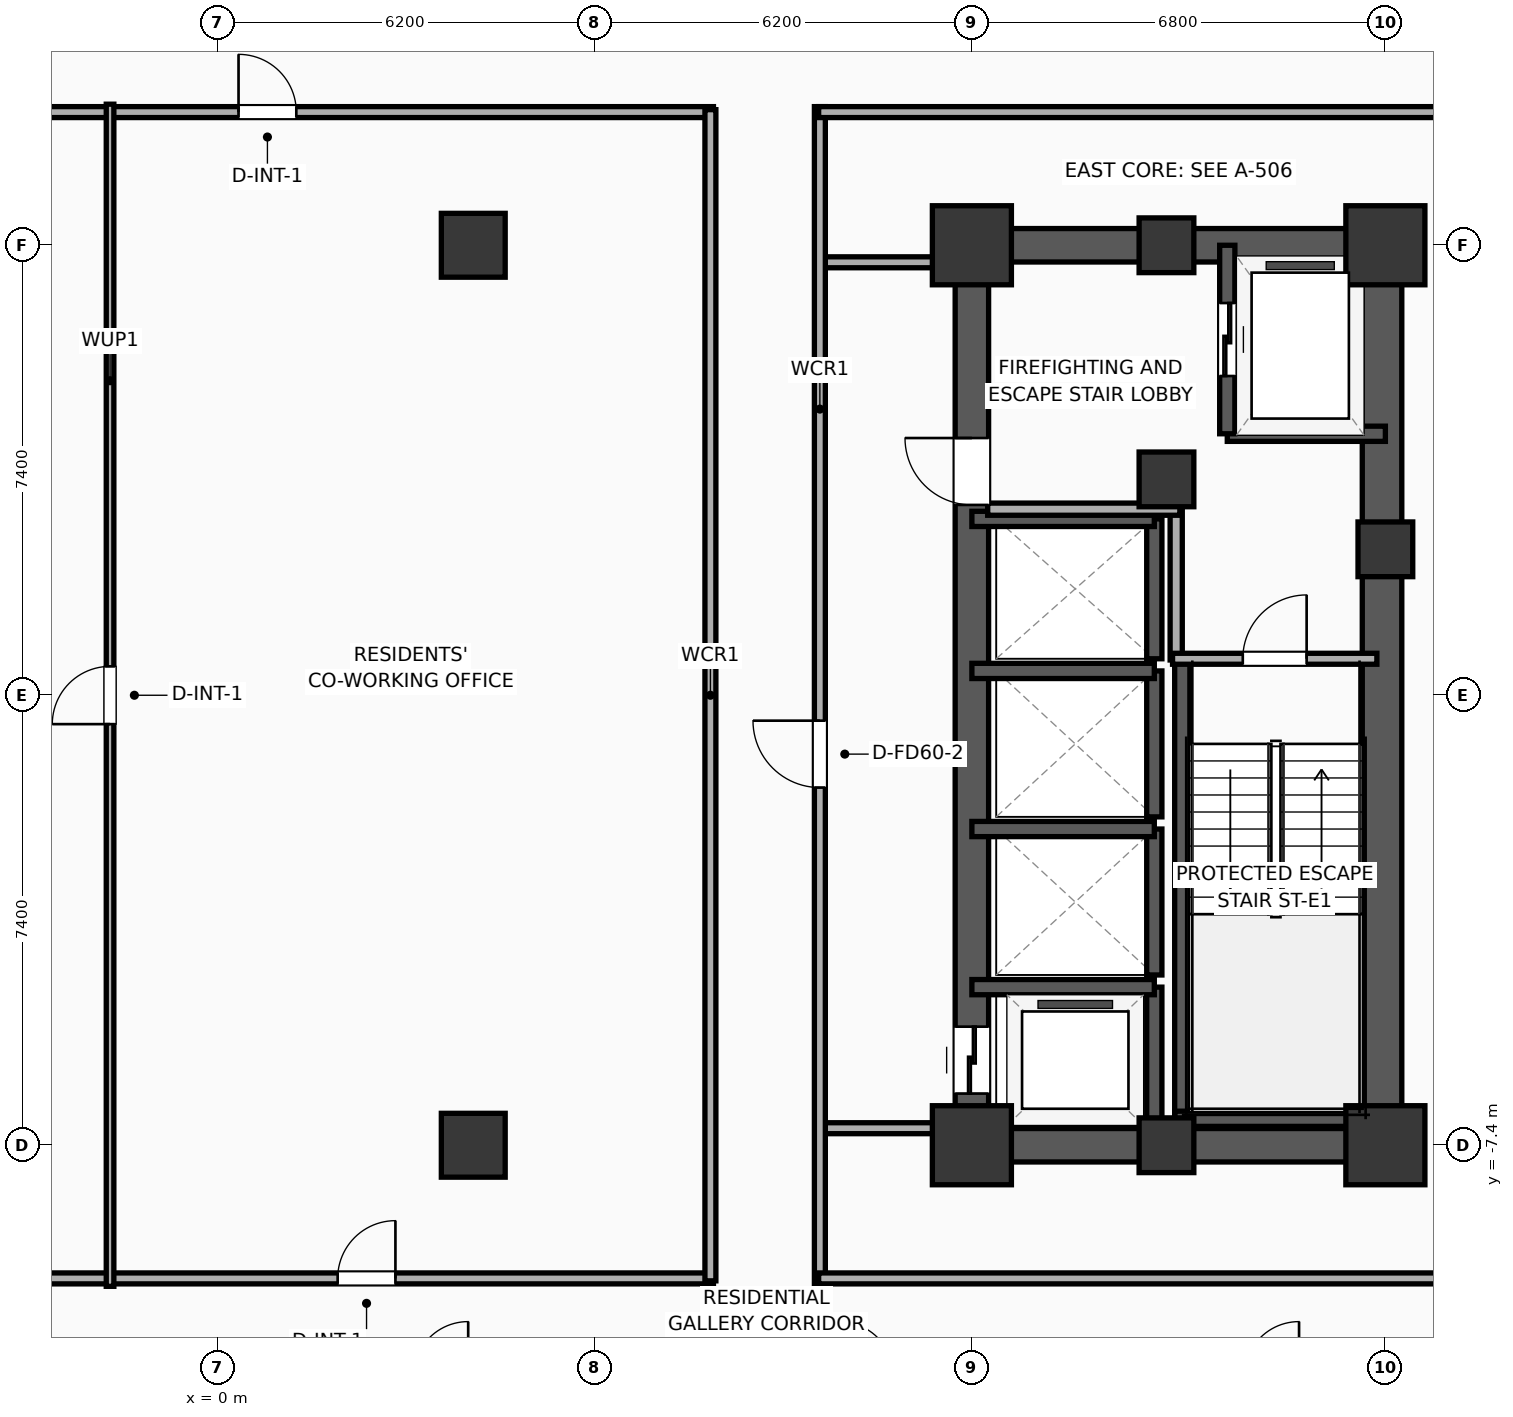
"""IFC4 building model, lengths in metres.
Left out: names, types, materials, properties, quantities, classifications, styles, units other than length and angle.
Written with IfcOpenShell. Run it as: python <this file> out.ifc"""

import sys

from ifc_helpers import new_model, si_unit, direction, frame, frame_2d, origin, origin_2d, place, context, subcontext, project, spatial, rectangle, extrude, element, fill, save


model = new_model("IFC4")
c1 = context("Model", 3, precision=1e-05, world=origin(), true_north=direction((0.0, 1.0)))
c2 = subcontext(c1, "Body", "Model", "MODEL_VIEW")
j1 = project(units=[si_unit("LENGTHUNIT", "METRE"), si_unit("PLANEANGLEUNIT", "RADIAN")], contexts=[c1])
p1 = place(None, origin())
s1 = spatial("IfcSite", under=j1, at=p1, CompositionType="ELEMENT")
p2 = place(p1, origin())
s2 = spatial("IfcBuilding", under=s1, at=p2, CompositionType="ELEMENT")
p3 = place(p2, frame((0.0, 0.0, 120.9)))
s3 = spatial("IfcBuildingStorey", under=s2, at=p3, CompositionType="ELEMENT", Elevation=120.9)
p4 = place(p3, frame((12.4, -7.4, 0.0), z_axis=(0.0, 0.0, 1.0), x_axis=(1.0, 0.0, 0.0)))
e1 = element("IfcColumn", 1, at=p4, inside=s3, PredefinedType="COLUMN", context=c2, shape_type="SweptSolid", body=[
    extrude(rectangle(XDim=1.3, YDim=1.3, at=origin_2d()), origin(), (0.0, 0.0, 1.0), 3.9),
])
p5 = place(p3, frame((15.6, 3.55, 0.0), z_axis=(0.0, 0.0, 1.0), x_axis=(1.0, 0.0, 0.0)))
e2 = element("IfcColumn", 2, at=p5, inside=s3, PredefinedType="COLUMN", context=c2, shape_type="SweptSolid", body=[
    extrude(rectangle(XDim=0.9, YDim=0.9, at=origin_2d()), origin(), (0.0, 0.0, 1.0), 3.9),
])
p6 = place(p3, frame((12.4, 7.4, 0.0), z_axis=(0.0, 0.0, 1.0), x_axis=(1.0, 0.0, 0.0)))
e3 = element("IfcColumn", 3, at=p6, inside=s3, PredefinedType="COLUMN", context=c2, shape_type="SweptSolid", body=[
    extrude(rectangle(XDim=1.3, YDim=1.3, at=origin_2d()), origin(), (0.0, 0.0, 1.0), 3.9),
])
for number, where, z_axis, x_axis in (
    (4, (15.6, -7.4, 0.0), (0.0, 0.0, 1.0), (1.0, 0.0, 0.0)),
    (5, (15.6, 7.4, 0.0), (0.0, 0.0, 1.0), (1.0, 0.0, 0.0)),
):
    element("IfcColumn", number, at=place(p3, frame(where, z_axis=z_axis, x_axis=x_axis)), inside=s3, PredefinedType="COLUMN", context=c2, shape_type="SweptSolid", body=[
        extrude(rectangle(XDim=0.9, YDim=0.9, at=origin_2d()), origin(), (0.0, 0.0, 1.0), 3.9),
    ])
p7 = place(p3, frame((19.2, -7.4, 0.0), z_axis=(0.0, 0.0, 1.0), x_axis=(1.0, 0.0, 0.0)))
e6 = element("IfcColumn", 6, at=p7, inside=s3, PredefinedType="COLUMN", context=c2, shape_type="SweptSolid", body=[
    extrude(rectangle(XDim=1.3, YDim=1.3, at=origin_2d()), origin(), (0.0, 0.0, 1.0), 3.9),
])
p8 = place(p3, frame((19.2, 2.4, 0.0), z_axis=(0.0, 0.0, 1.0), x_axis=(1.0, 0.0, 0.0)))
e7 = element("IfcColumn", 7, at=p8, inside=s3, PredefinedType="COLUMN", context=c2, shape_type="SweptSolid", body=[
    extrude(rectangle(XDim=0.9, YDim=0.9, at=origin_2d()), origin(), (0.0, 0.0, 1.0), 3.9),
])
p9 = place(p3, frame((19.2, 7.4, 0.0), z_axis=(0.0, 0.0, 1.0), x_axis=(1.0, 0.0, 0.0)))
e8 = element("IfcColumn", 8, at=p9, inside=s3, PredefinedType="COLUMN", context=c2, shape_type="SweptSolid", body=[
    extrude(rectangle(XDim=1.3, YDim=1.3, at=origin_2d()), origin(), (0.0, 0.0, 1.0), 3.9),
])
for number, where, z_axis, x_axis in (
    (9, (12.125, -7.4, 0.0), (0.0, 0.0, 1.0), (1.0, 0.0, 0.0)),
    (10, (12.125, 7.4, 0.0), (0.0, 0.0, 1.0), (1.0, 0.0, 0.0)),
):
    element("IfcWall", number, at=place(p3, frame(where, z_axis=z_axis, x_axis=x_axis)), inside=s3, PredefinedType="SHEAR", context=c2, shape_type="SweptSolid", body=[
        extrude(rectangle(XDim=7.35, YDim=0.55, at=frame_2d((3.675, 0.0))), origin(), (0.0, 0.0, 1.0), 3.65),
    ])
p10 = place(p3, frame((12.4, -7.4, 0.0), z_axis=(0.0, 0.0, 1.0), x_axis=(0.0, 1.0, 0.0)))
e11 = element("IfcWall", 11, at=p10, inside=s3, PredefinedType="SHEAR", context=c2, shape_type="SweptSolid", body=[
    extrude(rectangle(XDim=14.8, YDim=0.55, at=frame_2d((7.4, 0.0))), origin(), (0.0, 0.0, 1.0), 3.65),
])
p11 = place(p10, frame((0.85, 0.0, 0.0)))
e12 = element("IfcOpeningElement", 12, at=p11, cuts=e11, PredefinedType="OPENING", context=c2, shape_type="SweptSolid", body=[
    extrude(rectangle(XDim=1.1, YDim=2.05, at=frame_2d((0.55, 1.025))), frame((0.0, 0.285, 0.0), z_axis=(0.0, -1.0, 0.0), x_axis=(1.0, 0.0, 0.0)), (0.0, 0.0, 1.0), 0.57),
])
p12 = place(p10, frame((10.53, 0.0, 0.0)))
e13 = element("IfcOpeningElement", 13, at=p12, cuts=e11, PredefinedType="OPENING", context=c2, shape_type="SweptSolid", body=[
    extrude(rectangle(XDim=1.1, YDim=2.05, at=frame_2d((0.55, 1.025))), frame((0.0, 0.285, 0.0), z_axis=(0.0, -1.0, 0.0), x_axis=(1.0, 0.0, 0.0)), (0.0, 0.0, 1.0), 0.57),
])
p13 = place(p3, frame((19.145, -7.4, 0.0), z_axis=(0.0, 0.0, 1.0), x_axis=(0.0, 1.0, 0.0)))
e14 = element("IfcWall", 14, at=p13, inside=s3, PredefinedType="SHEAR", context=c2, shape_type="SweptSolid", body=[
    extrude(rectangle(XDim=14.8, YDim=0.65, at=frame_2d((7.4, 0.0))), origin(), (0.0, 0.0, 1.0), 3.65),
])
p14 = place(p3, frame((15.86, -7.085, 0.0), z_axis=(0.0, 0.0, 1.0), x_axis=(0.0, 1.0, 0.0)))
e15 = element("IfcWall", 15, at=p14, inside=s3, PredefinedType="SOLIDWALL", context=c2, shape_type="SweptSolid", body=[
    extrude(rectangle(XDim=7.685, YDim=0.25, at=frame_2d((3.843, 0.0))), origin(), (0.0, 0.0, 1.0), 3.65),
])
p15 = place(p3, frame((15.74, -6.965, 0.0), z_axis=(0.0, 0.0, 1.0), x_axis=(1.0, 0.0, 0.0)))
e16 = element("IfcWall", 16, at=p15, inside=s3, PredefinedType="SOLIDWALL", context=c2, shape_type="SweptSolid", body=[
    extrude(rectangle(XDim=3.46, YDim=0.25, at=frame_2d((1.73, 0.0))), origin(), (0.0, 0.0, 1.0), 3.65),
])
for number, where, z_axis, x_axis in (
    (17, (4.2, -7.4, 0.0), (0.0, 0.0, 1.0), (1.0, 0.0, 0.0)),
    (18, (4.2, 7.4, 0.0), (0.0, 0.0, 1.0), (1.0, 0.0, 0.0)),
):
    element("IfcColumn", number, at=place(p3, frame(where, z_axis=z_axis, x_axis=x_axis)), inside=s3, PredefinedType="COLUMN", context=c2, shape_type="SweptSolid", body=[
        extrude(rectangle(XDim=1.05, YDim=1.05, at=origin_2d()), origin(), (0.0, 0.0, 1.0), 3.9),
    ])
p16 = place(p3, frame((16.6, 4.3, 0.0), z_axis=(0.0, 0.0, 1.0), x_axis=(1.0, 0.0, 0.0)))
e19 = element("IfcWall", 19, at=p16, inside=s3, PredefinedType="SOLIDWALL", context=c2, shape_type="SweptSolid", body=[
    extrude(rectangle(XDim=2.6, YDim=0.25, at=frame_2d((1.3, 0.0))), origin(), (0.0, 0.0, 1.0), 3.65),
])
p17 = place(p3, frame((16.6, 7.4, 0.0), z_axis=(0.0, 0.0, 1.0), x_axis=(0.0, -1.0, 0.0)))
e20 = element("IfcWall", 20, at=p17, inside=s3, PredefinedType="SOLIDWALL", context=c2, shape_type="SweptSolid", body=[
    extrude(rectangle(XDim=3.1, YDim=0.25, at=frame_2d((1.55, 0.0))), origin(), (0.0, 0.0, 1.0), 3.65),
])
p18 = place(p17, frame((0.95, 0.0, 0.0)))
e21 = element("IfcOpeningElement", 21, at=p18, cuts=e20, PredefinedType="OPENING", context=c2, shape_type="SweptSolid", body=[
    extrude(rectangle(XDim=1.2, YDim=2.05, at=frame_2d((0.6, 1.025))), frame((0.0, 0.135, 0.0), z_axis=(0.0, -1.0, 0.0), x_axis=(1.0, 0.0, 0.0)), (0.0, 0.0, 1.0), 0.27),
])
p19 = place(p3, frame((15.4, -7.4, 0.0), z_axis=(0.0, 0.0, 1.0), x_axis=(0.0, 1.0, 0.0)))
e22 = element("IfcWall", 22, at=p19, inside=s3, PredefinedType="SOLIDWALL", context=c2, shape_type="SweptSolid", body=[
    extrude(rectangle(XDim=2.6, YDim=0.25, at=frame_2d((1.3, 0.0))), origin(), (0.0, 0.0, 1.0), 3.65),
])
p20 = place(p3, frame((15.4, -4.8, 0.0), z_axis=(0.0, 0.0, 1.0), x_axis=(-1.0, 0.0, 0.0)))
e23 = element("IfcWall", 23, at=p20, inside=s3, PredefinedType="SOLIDWALL", context=c2, shape_type="SweptSolid", body=[
    extrude(rectangle(XDim=3.0, YDim=0.25, at=frame_2d((1.5, 0.0))), origin(), (0.0, 0.0, 1.0), 3.65),
])
p21 = place(p3, frame((15.4, -4.6, 0.0), z_axis=(0.0, 0.0, 1.0), x_axis=(0.0, 1.0, 0.0)))
e24 = element("IfcWall", 24, at=p21, inside=s3, PredefinedType="SOLIDWALL", context=c2, shape_type="SweptSolid", body=[
    extrude(rectangle(XDim=2.4, YDim=0.25, at=frame_2d((1.2, 0.0))), origin(), (0.0, 0.0, 1.0), 3.65),
])
p22 = place(p3, frame((15.4, -2.2, 0.0), z_axis=(0.0, 0.0, 1.0), x_axis=(-1.0, 0.0, 0.0)))
e25 = element("IfcWall", 25, at=p22, inside=s3, PredefinedType="SOLIDWALL", context=c2, shape_type="SweptSolid", body=[
    extrude(rectangle(XDim=3.0, YDim=0.25, at=frame_2d((1.5, 0.0))), origin(), (0.0, 0.0, 1.0), 3.65),
])
p23 = place(p3, frame((15.4, -2.0, 0.0), z_axis=(0.0, 0.0, 1.0), x_axis=(0.0, 1.0, 0.0)))
e26 = element("IfcWall", 26, at=p23, inside=s3, PredefinedType="SOLIDWALL", context=c2, shape_type="SweptSolid", body=[
    extrude(rectangle(XDim=2.4, YDim=0.25, at=frame_2d((1.2, 0.0))), origin(), (0.0, 0.0, 1.0), 3.65),
])
p24 = place(p3, frame((15.4, 0.4, 0.0), z_axis=(0.0, 0.0, 1.0), x_axis=(-1.0, 0.0, 0.0)))
e27 = element("IfcWall", 27, at=p24, inside=s3, PredefinedType="SOLIDWALL", context=c2, shape_type="SweptSolid", body=[
    extrude(rectangle(XDim=3.0, YDim=0.25, at=frame_2d((1.5, 0.0))), origin(), (0.0, 0.0, 1.0), 3.65),
])
p25 = place(p3, frame((15.4, 0.6, 0.0), z_axis=(0.0, 0.0, 1.0), x_axis=(0.0, 1.0, 0.0)))
e28 = element("IfcWall", 28, at=p25, inside=s3, PredefinedType="SOLIDWALL", context=c2, shape_type="SweptSolid", body=[
    extrude(rectangle(XDim=2.3, YDim=0.25, at=frame_2d((1.15, 0.0))), origin(), (0.0, 0.0, 1.0), 3.65),
])
p26 = place(p3, frame((15.4, 2.9, 0.0), z_axis=(0.0, 0.0, 1.0), x_axis=(-1.0, 0.0, 0.0)))
e29 = element("IfcWall", 29, at=p26, inside=s3, PredefinedType="SOLIDWALL", context=c2, shape_type="SweptSolid", body=[
    extrude(rectangle(XDim=3.0, YDim=0.25, at=frame_2d((1.5, 0.0))), origin(), (0.0, 0.0, 1.0), 3.65),
])
p27 = place(p3, frame((15.76, 0.58, 0.0), z_axis=(0.0, 0.0, 1.0), x_axis=(0.0, 1.0, 0.0)))
e30 = element("IfcWall", 30, at=p27, inside=s3, PredefinedType="PARTITIONING", context=c2, shape_type="SweptSolid", body=[
    extrude(rectangle(XDim=2.52, YDim=0.2, at=frame_2d((1.26, 0.0))), origin(), (0.0, 0.0, 1.0), 3.65),
])
p28 = place(p3, frame((12.66, 3.06, 0.0), z_axis=(0.0, 0.0, 1.0), x_axis=(1.0, 0.0, 0.0)))
e31 = element("IfcWall", 31, at=p28, inside=s3, PredefinedType="PARTITIONING", context=c2, shape_type="SweptSolid", body=[
    extrude(rectangle(XDim=3.16, YDim=0.2, at=frame_2d((1.58, 0.0))), origin(), (0.0, 0.0, 1.0), 3.65),
])
p29 = place(p3, frame((15.7, 0.6, 0.0), z_axis=(0.0, 0.0, 1.0), x_axis=(1.0, 0.0, 0.0)))
e32 = element("IfcWall", 32, at=p29, inside=s3, PredefinedType="PARTITIONING", context=c2, shape_type="SweptSolid", body=[
    extrude(rectangle(XDim=3.36, YDim=0.18, at=frame_2d((1.68, 0.0))), origin(), (0.0, 0.0, 1.0), 3.65),
])
p30 = place(p29, frame((1.155, 0.0, 0.0)))
e33 = element("IfcOpeningElement", 33, at=p30, cuts=e32, PredefinedType="OPENING", context=c2, shape_type="SweptSolid", body=[
    extrude(rectangle(XDim=1.05, YDim=2.05, at=frame_2d((0.525, 1.025))), frame((0.0, 0.1, 0.0), z_axis=(0.0, -1.0, 0.0), x_axis=(1.0, 0.0, 0.0)), (0.0, 0.0, 1.0), 0.2),
])
for number, where, z_axis, x_axis in (
    (34, (9.88, 7.12, 0.0), (0.0, 0.0, 1.0), (1.0, 0.0, 0.0)),
    (35, (9.88, -7.12, 0.0), (0.0, 0.0, 1.0), (1.0, 0.0, 0.0)),
):
    element("IfcWall", number, at=place(p3, frame(where, z_axis=z_axis, x_axis=x_axis)), inside=s3, PredefinedType="PARTITIONING", context=c2, shape_type="SweptSolid", body=[
        extrude(rectangle(XDim=2.27, YDim=0.18, at=frame_2d((1.135, 0.0))), origin(), (0.0, 0.0, 1.0), 3.65),
    ])
p31 = place(p3, frame((9.9, -9.68, 0.0), z_axis=(0.0, 0.0, 1.0), x_axis=(0.0, 1.0, 0.0)))
e36 = element("IfcWall", 36, at=p31, inside=s3, PredefinedType="PARTITIONING", context=c2, shape_type="SweptSolid", body=[
    extrude(rectangle(XDim=19.36, YDim=0.18, at=frame_2d((9.68, 0.0))), origin(), (0.0, 0.0, 1.0), 3.65),
])
p32 = place(p31, frame((8.162, 0.0, 0.0)))
e37 = element("IfcOpeningElement", 37, at=p32, cuts=e36, PredefinedType="OPENING", context=c2, shape_type="SweptSolid", body=[
    extrude(rectangle(XDim=1.1, YDim=2.05, at=frame_2d((0.55, 1.025))), frame((0.0, 0.1, 0.0), z_axis=(0.0, -1.0, 0.0), x_axis=(1.0, 0.0, 0.0)), (0.0, 0.0, 1.0), 0.2),
])
p33 = place(p3, frame((9.88, 9.59, 0.0), z_axis=(0.0, 0.0, 1.0), x_axis=(1.0, 0.0, 0.0)))
e38 = element("IfcWall", 38, at=p33, inside=s3, PredefinedType="PARTITIONING", context=c2, shape_type="SweptSolid", body=[
    extrude(rectangle(XDim=23.33, YDim=0.18, at=frame_2d((11.665, 0.0))), origin(), (0.0, 0.0, 1.0), 3.65),
])
p34 = place(p33, frame((17.59, 0.0, 0.0)))
e39 = element("IfcOpeningElement", 39, at=p34, cuts=e38, PredefinedType="OPENING", context=c2, shape_type="SweptSolid", body=[
    extrude(rectangle(XDim=1.15, YDim=2.05, at=frame_2d((0.575, 1.025))), frame((0.0, 0.1, 0.0), z_axis=(0.0, -1.0, 0.0), x_axis=(1.0, 0.0, 0.0)), (0.0, 0.0, 1.0), 0.2),
])
p35 = place(p3, frame((9.88, -9.59, 0.0), z_axis=(0.0, 0.0, 1.0), x_axis=(1.0, 0.0, 0.0)))
e40 = element("IfcWall", 40, at=p35, inside=s3, PredefinedType="PARTITIONING", context=c2, shape_type="SweptSolid", body=[
    extrude(rectangle(XDim=23.33, YDim=0.18, at=frame_2d((11.665, 0.0))), origin(), (0.0, 0.0, 1.0), 3.65),
])
p36 = place(p3, frame((-8.15, 9.59, 0.0), z_axis=(0.0, 0.0, 1.0), x_axis=(1.0, 0.0, 0.0)))
e41 = element("IfcWall", 41, at=p36, inside=s3, PredefinedType="PARTITIONING", context=c2, shape_type="SweptSolid", body=[
    extrude(rectangle(XDim=16.3, YDim=0.18, at=frame_2d((8.15, 0.0))), origin(), (0.0, 0.0, 1.0), 3.65),
])
p37 = place(p36, frame((8.49, 0.0, 0.0)))
e42 = element("IfcOpeningElement", 42, at=p37, cuts=e41, PredefinedType="OPENING", context=c2, shape_type="SweptSolid", body=[
    extrude(rectangle(XDim=0.95, YDim=2.05, at=frame_2d((0.475, 1.025))), frame((0.0, 0.1, 0.0), z_axis=(0.0, -1.0, 0.0), x_axis=(1.0, 0.0, 0.0)), (0.0, 0.0, 1.0), 0.2),
])
p38 = place(p3, frame((-8.15, -9.59, 0.0), z_axis=(0.0, 0.0, 1.0), x_axis=(1.0, 0.0, 0.0)))
e43 = element("IfcWall", 43, at=p38, inside=s3, PredefinedType="PARTITIONING", context=c2, shape_type="SweptSolid", body=[
    extrude(rectangle(XDim=16.3, YDim=0.18, at=frame_2d((8.15, 0.0))), origin(), (0.0, 0.0, 1.0), 3.65),
])
p39 = place(p38, frame((1.13, 0.0, 0.0)))
e44 = element("IfcOpeningElement", 44, at=p39, cuts=e43, PredefinedType="OPENING", context=c2, shape_type="SweptSolid", body=[
    extrude(rectangle(XDim=1.0, YDim=2.05, at=frame_2d((0.5, 1.025))), frame((0.0, 0.1, 0.0), z_axis=(0.0, -1.0, 0.0), x_axis=(1.0, 0.0, 0.0)), (0.0, 0.0, 1.0), 0.2),
])
p40 = place(p38, frame((10.12, 0.0, 0.0)))
e45 = element("IfcOpeningElement", 45, at=p40, cuts=e43, PredefinedType="OPENING", context=c2, shape_type="SweptSolid", body=[
    extrude(rectangle(XDim=0.95, YDim=2.05, at=frame_2d((0.475, 1.025))), frame((0.0, 0.1, 0.0), z_axis=(0.0, -1.0, 0.0), x_axis=(1.0, 0.0, 0.0)), (0.0, 0.0, 1.0), 0.2),
])
p41 = place(p3, frame((8.1, -9.63, 0.0), z_axis=(0.0, 0.0, 1.0), x_axis=(0.0, 1.0, 0.0)))
e46 = element("IfcWall", 46, at=p41, inside=s3, PredefinedType="PARTITIONING", context=c2, shape_type="SweptSolid", body=[
    extrude(rectangle(XDim=19.26, YDim=0.18, at=frame_2d((9.63, 0.0))), origin(), (0.0, 0.0, 1.0), 3.65),
])
p42 = place(p3, frame((-1.773, -9.72, 0.0), z_axis=(0.0, 0.0, 1.0), x_axis=(0.0, 1.0, 0.0)))
e47 = element("IfcWall", 47, at=p42, inside=s3, PredefinedType="PARTITIONING", context=c2, shape_type="SweptSolid", body=[
    extrude(rectangle(XDim=19.44, YDim=0.125, at=frame_2d((9.72, 0.0))), origin(), (0.0, 0.0, 1.0), 3.65),
])
p43 = place(p42, frame((9.245, 0.0, 0.0)))
e48 = element("IfcOpeningElement", 48, at=p43, cuts=e47, PredefinedType="OPENING", context=c2, shape_type="SweptSolid", body=[
    extrude(rectangle(XDim=0.95, YDim=2.05, at=frame_2d((0.475, 1.025))), frame((0.0, 0.073, 0.0), z_axis=(0.0, -1.0, 0.0), x_axis=(1.0, 0.0, 0.0)), (0.0, 0.0, 1.0), 0.145),
])
p44 = place(p18, origin())
e49 = element("IfcDoor", 49, at=p44, inside=s3, OperationType="SLIDING_TO_LEFT", PredefinedType="DOOR", context=c2, shape_type="SweptSolid", body=[
    extrude(rectangle(XDim=1.2, YDim=2.05, at=frame_2d((0.6, 1.025))), frame((0.0, 0.025, 0.0), z_axis=(0.0, -1.0, 0.0), x_axis=(1.0, 0.0, 0.0)), (0.0, 0.0, 1.0), 0.05),
])
fill(e21, e49)
p45 = place(p11, origin())
e50 = element("IfcDoor", 50, at=p45, inside=s3, OperationType="SLIDING_TO_LEFT", PredefinedType="DOOR", context=c2, shape_type="SweptSolid", body=[
    extrude(rectangle(XDim=1.1, YDim=2.05, at=frame_2d((0.55, 1.025))), frame((0.0, 0.025, 0.0), z_axis=(0.0, -1.0, 0.0), x_axis=(1.0, 0.0, 0.0)), (0.0, 0.0, 1.0), 0.05),
])
fill(e12, e50)
p46 = place(p30, origin())
e51 = element("IfcDoor", 51, at=p46, inside=s3, OperationType="SINGLE_SWING_RIGHT", PredefinedType="DOOR", context=c2, shape_type="SweptSolid", body=[
    extrude(rectangle(XDim=1.05, YDim=2.05, at=frame_2d((0.525, 1.025))), frame((0.0, 0.025, 0.0), z_axis=(0.0, -1.0, 0.0), x_axis=(1.0, 0.0, 0.0)), (0.0, 0.0, 1.0), 0.05),
])
fill(e33, e51)
p47 = place(p32, origin())
e52 = element("IfcDoor", 52, at=p47, inside=s3, OperationType="SINGLE_SWING_RIGHT", PredefinedType="DOOR", context=c2, shape_type="SweptSolid", body=[
    extrude(rectangle(XDim=1.1, YDim=2.05, at=frame_2d((0.55, 1.025))), frame((0.0, 0.025, 0.0), z_axis=(0.0, -1.0, 0.0), x_axis=(1.0, 0.0, 0.0)), (0.0, 0.0, 1.0), 0.05),
])
fill(e37, e52)
p48 = place(p37, origin())
e53 = element("IfcDoor", 53, at=p48, inside=s3, OperationType="SINGLE_SWING_LEFT", PredefinedType="DOOR", context=c2, shape_type="SweptSolid", body=[
    extrude(rectangle(XDim=0.95, YDim=2.05, at=frame_2d((0.475, 1.025))), frame((0.0, 0.025, 0.0), z_axis=(0.0, -1.0, 0.0), x_axis=(1.0, 0.0, 0.0)), (0.0, 0.0, 1.0), 0.05),
])
fill(e42, e53)
p49 = place(p40, origin())
e54 = element("IfcDoor", 54, at=p49, inside=s3, OperationType="SINGLE_SWING_RIGHT", PredefinedType="DOOR", context=c2, shape_type="SweptSolid", body=[
    extrude(rectangle(XDim=0.95, YDim=2.05, at=frame_2d((0.475, 1.025))), frame((0.0, 0.025, 0.0), z_axis=(0.0, -1.0, 0.0), x_axis=(1.0, 0.0, 0.0)), (0.0, 0.0, 1.0), 0.05),
])
fill(e45, e54)
p50 = place(p43, origin())
e55 = element("IfcDoor", 55, at=p50, inside=s3, OperationType="SINGLE_SWING_LEFT", PredefinedType="DOOR", context=c2, shape_type="SweptSolid", body=[
    extrude(rectangle(XDim=0.95, YDim=2.05, at=frame_2d((0.475, 1.025))), frame((0.0, 0.025, 0.0), z_axis=(0.0, -1.0, 0.0), x_axis=(1.0, 0.0, 0.0)), (0.0, 0.0, 1.0), 0.05),
])
fill(e48, e55)
p51 = place(p12, origin())
e56 = element("IfcDoor", 56, at=p51, inside=s3, OperationType="SINGLE_SWING_RIGHT", PredefinedType="DOOR", context=c2, shape_type="SweptSolid", body=[
    extrude(rectangle(XDim=1.1, YDim=2.05, at=frame_2d((0.55, 1.025))), frame((0.0, 0.025, 0.0), z_axis=(0.0, -1.0, 0.0), x_axis=(1.0, 0.0, 0.0)), (0.0, 0.0, 1.0), 0.05),
])
fill(e13, e56)
save(model, sys.argv[1])
